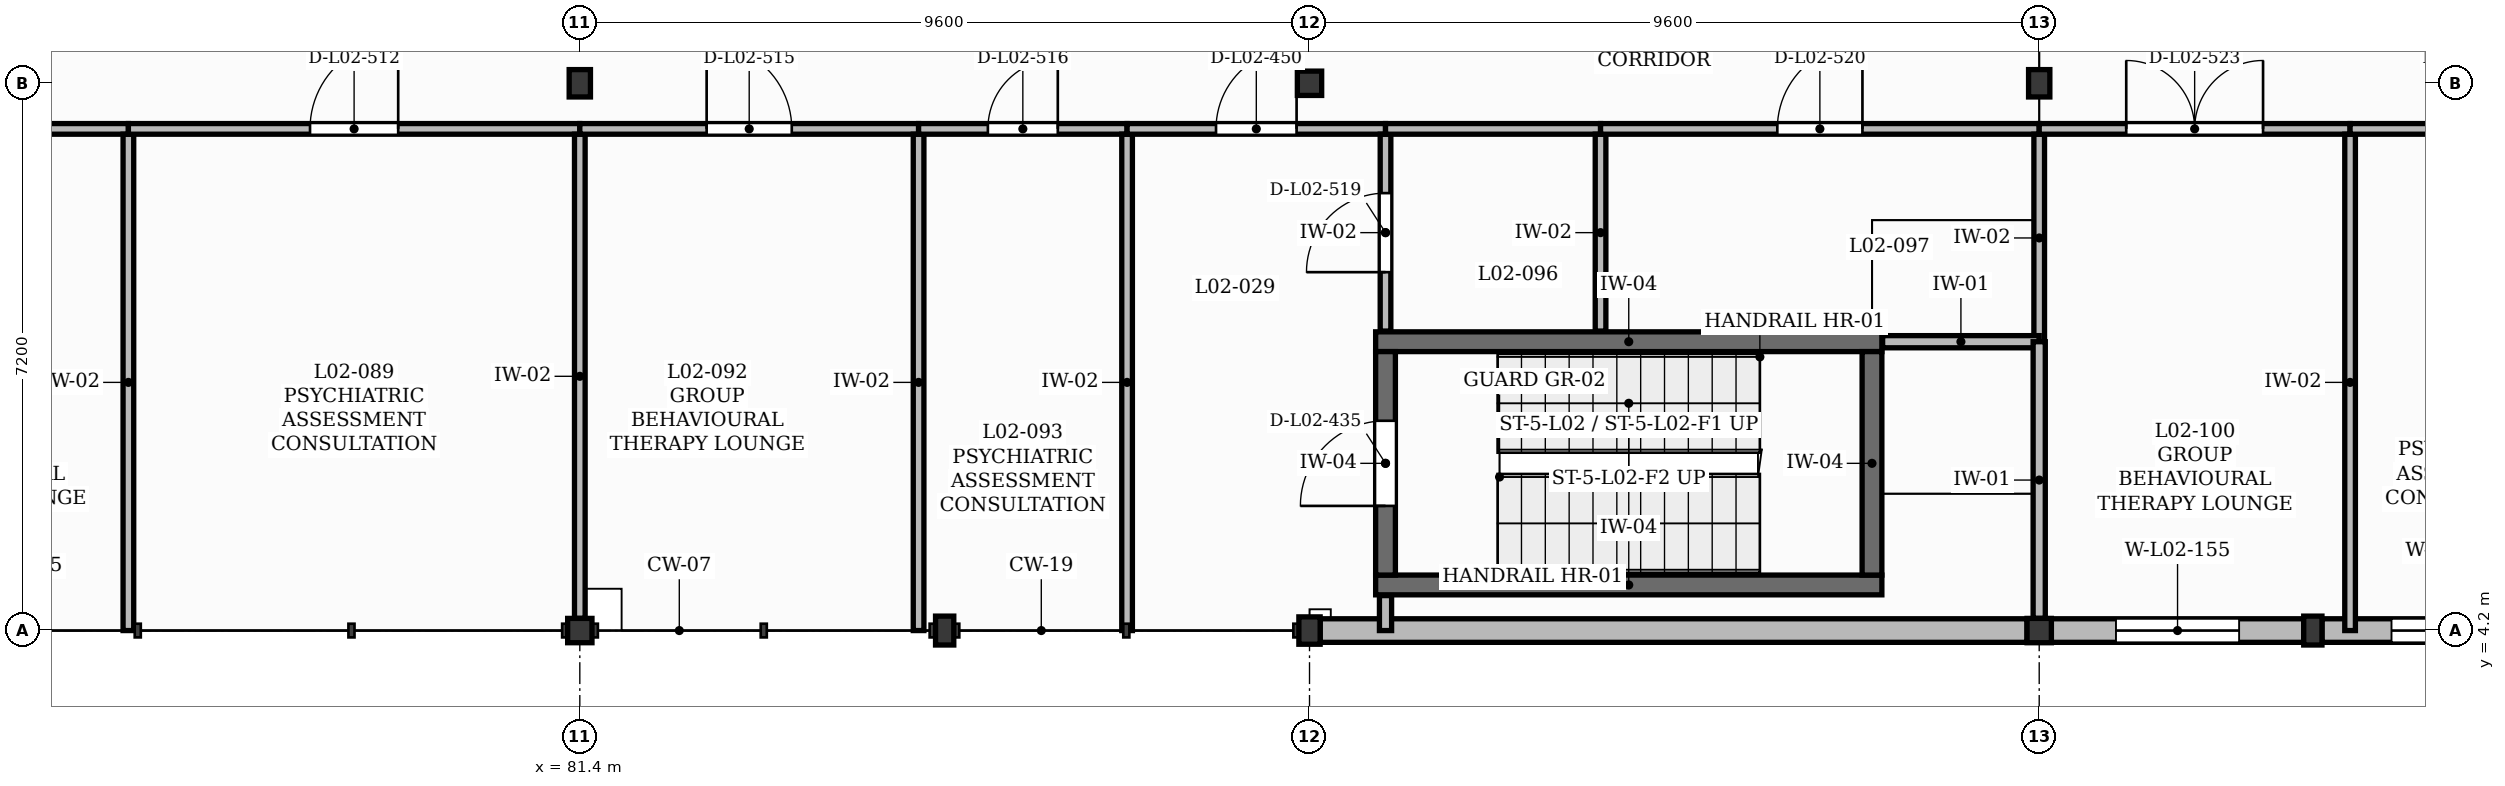
"""IFC4 building model, lengths in metres.
Left out: names, types, materials, properties, quantities, classifications, styles, units other than length and angle.
Written with IfcOpenShell. Run it as: python <this file> out.ifc"""

import sys

from ifc_helpers import new_model, si_unit, direction, frame, frame_2d, origin, origin_2d, place, context, subcontext, project, spatial, rectangle, extrude, element, fill, save


model = new_model("IFC4")
c1 = context("Model", 3, precision=1e-05, world=origin(), true_north=direction((0.0, 1.0)))
c2 = subcontext(c1, "Body", "Model", "MODEL_VIEW")
j1 = project(units=[si_unit("LENGTHUNIT", "METRE"), si_unit("PLANEANGLEUNIT", "RADIAN")], contexts=[c1])
p1 = place(None, origin())
s1 = spatial("IfcSite", under=j1, at=p1, CompositionType="ELEMENT")
p2 = place(p1, origin())
s2 = spatial("IfcBuilding", under=s1, at=p2, CompositionType="ELEMENT")
p3 = place(p2, frame((0.0, 0.0, 9.0)))
s3 = spatial("IfcBuildingStorey", under=s2, at=p3, CompositionType="ELEMENT", Elevation=9.0)
p4 = place(p3, frame((81.4, 4.2, 0.0), z_axis=(0.0, 0.0, 1.0), x_axis=(1.0, 0.0, 0.0)))
e1 = element("IfcColumn", 1, at=p4, inside=s3, PredefinedType="COLUMN", context=c2, shape_type="SweptSolid", body=[
    extrude(rectangle(XDim=0.32, YDim=0.32, at=origin_2d()), origin(), (0.0, 0.0, 1.0), 3.99),
])
for number, where, z_axis, x_axis in (
    (2, (81.4, 11.4, 0.0), (0.0, 0.0, 1.0), (1.0, 0.0, 0.0)),
    (3, (91.0, 4.2, 0.0), (0.0, 0.0, 1.0), (1.0, 0.0, 0.0)),
):
    element("IfcColumn", number, at=place(p3, frame(where, z_axis=z_axis, x_axis=x_axis)), inside=s3, PredefinedType="COLUMN", context=c2, shape_type="SweptSolid", body=[
        extrude(rectangle(XDim=0.28, YDim=0.36, at=origin_2d()), origin(), (0.0, 0.0, 1.0), 3.99),
    ])
for number, where, z_axis, x_axis in (
    (4, (91.0, 11.4, 0.0), (0.0, 0.0, 1.0), (1.0, 0.0, 0.0)),
    (5, (100.6, 4.2, 0.0), (0.0, 0.0, 1.0), (1.0, 0.0, 0.0)),
):
    element("IfcColumn", number, at=place(p3, frame(where, z_axis=z_axis, x_axis=x_axis)), inside=s3, PredefinedType="COLUMN", context=c2, shape_type="SweptSolid", body=[
        extrude(rectangle(XDim=0.32, YDim=0.32, at=origin_2d()), origin(), (0.0, 0.0, 1.0), 3.99),
    ])
p5 = place(p3, frame((100.6, 11.4, 0.0), z_axis=(0.0, 0.0, 1.0), x_axis=(1.0, 0.0, 0.0)))
e6 = element("IfcColumn", 6, at=p5, inside=s3, PredefinedType="COLUMN", context=c2, shape_type="SweptSolid", body=[
    extrude(rectangle(XDim=0.28, YDim=0.36, at=origin_2d()), origin(), (0.0, 0.0, 1.0), 3.99),
])
for number, where, z_axis, x_axis in (
    (7, (86.2, 4.2, 0.0), (0.0, 0.0, 1.0), (1.0, 0.0, 0.0)),
    (8, (104.2, 4.2, 0.0), (0.0, 0.0, 1.0), (1.0, 0.0, 0.0)),
):
    element("IfcColumn", number, at=place(p3, frame(where, z_axis=z_axis, x_axis=x_axis)), inside=s3, PredefinedType="PILASTER", context=c2, shape_type="SweptSolid", body=[
        extrude(rectangle(XDim=0.24, YDim=0.38, at=origin_2d()), origin(), (0.0, 0.0, 1.0), 3.99),
    ])
p6 = place(p3, frame((91.14, 4.2, 0.0), z_axis=(0.0, 0.0, 1.0), x_axis=(1.0, 0.0, 0.0)))
e9 = element("IfcWall", 9, at=p6, inside=s3, PredefinedType="SOLIDWALL", context=c2, shape_type="SweptSolid", body=[
    extrude(rectangle(XDim=9.3, YDim=0.31, at=frame_2d((4.65, 0.0))), origin(), (0.0, 0.0, 1.0), 3.53),
])
p7 = place(p3, frame((100.76, 4.2, 0.0), z_axis=(0.0, 0.0, 1.0), x_axis=(1.0, 0.0, 0.0)))
e10 = element("IfcWall", 10, at=p7, inside=s3, PredefinedType="SOLIDWALL", context=c2, shape_type="SweptSolid", body=[
    extrude(rectangle(XDim=3.32, YDim=0.31, at=frame_2d((1.66, 0.0))), origin(), (0.0, 0.0, 1.0), 3.52),
])
p8 = place(p7, frame((0.85, 0.0, 1.0)))
e11 = element("IfcOpeningElement", 11, at=p8, cuts=e10, PredefinedType="OPENING", context=c2, shape_type="SweptSolid", body=[
    extrude(rectangle(XDim=1.62, YDim=1.95, at=frame_2d((0.81, 0.975))), frame((0.0, 0.165, 0.0), z_axis=(0.0, -1.0, 0.0), x_axis=(1.0, 0.0, 0.0)), (0.0, 0.0, 1.0), 0.33),
])
p9 = place(p3, frame((104.32, 4.2, 0.0), z_axis=(0.0, 0.0, 1.0), x_axis=(1.0, 0.0, 0.0)))
e12 = element("IfcWall", 12, at=p9, inside=s3, PredefinedType="SOLIDWALL", context=c2, shape_type="SweptSolid", body=[
    extrude(rectangle(XDim=3.34, YDim=0.31, at=frame_2d((1.67, 0.0))), origin(), (0.0, 0.0, 1.0), 3.52),
])
p10 = place(p9, frame((0.915, 0.0, 1.0)))
e13 = element("IfcOpeningElement", 13, at=p10, cuts=e12, PredefinedType="OPENING", context=c2, shape_type="SweptSolid", body=[
    extrude(rectangle(XDim=1.76, YDim=1.95, at=frame_2d((0.88, 0.975))), frame((0.0, 0.165, 0.0), z_axis=(0.0, -1.0, 0.0), x_axis=(1.0, 0.0, 0.0)), (0.0, 0.0, 1.0), 0.33),
])
for number, where, z_axis, x_axis in (
    (14, (91.87, 4.8, 0.0), (0.0, 0.0, 1.0), (1.0, 0.0, 0.0)),
    (15, (91.87, 8.0, 0.0), (0.0, 0.0, 1.0), (1.0, 0.0, 0.0)),
):
    element("IfcWall", number, at=place(p3, frame(where, z_axis=z_axis, x_axis=x_axis)), inside=s3, PredefinedType="SHEAR", context=c2, shape_type="SweptSolid", body=[
        extrude(rectangle(XDim=6.66, YDim=0.26, at=frame_2d((3.33, 0.0))), origin(), (0.0, 0.0, 1.0), 3.95),
    ])
p11 = place(p3, frame((92.0, 4.93, 0.0), z_axis=(0.0, 0.0, 1.0), x_axis=(0.0, 1.0, 0.0)))
e16 = element("IfcWall", 16, at=p11, inside=s3, PredefinedType="SHEAR", context=c2, shape_type="SweptSolid", body=[
    extrude(rectangle(XDim=2.94, YDim=0.26, at=frame_2d((1.47, 0.0))), origin(), (0.0, 0.0, 1.0), 3.95),
])
p12 = place(p11, frame((0.91, 0.0, 0.0)))
e17 = element("IfcOpeningElement", 17, at=p12, cuts=e16, PredefinedType="OPENING", context=c2, shape_type="SweptSolid", body=[
    extrude(rectangle(XDim=1.12, YDim=2.1, at=frame_2d((0.56, 1.05))), frame((0.0, 0.14, 0.0), z_axis=(0.0, -1.0, 0.0), x_axis=(1.0, 0.0, 0.0)), (0.0, 0.0, 1.0), 0.28),
])
p13 = place(p3, frame((98.4, 4.93, 0.0), z_axis=(0.0, 0.0, 1.0), x_axis=(0.0, 1.0, 0.0)))
e18 = element("IfcWall", 18, at=p13, inside=s3, PredefinedType="SHEAR", context=c2, shape_type="SweptSolid", body=[
    extrude(rectangle(XDim=2.94, YDim=0.26, at=frame_2d((1.47, 0.0))), origin(), (0.0, 0.0, 1.0), 3.95),
])
p14 = place(p3, frame((71.805, 10.8, 0.0), z_axis=(0.0, 0.0, 1.0), x_axis=(1.0, 0.0, 0.0)))
e19 = element("IfcWall", 19, at=p14, inside=s3, PredefinedType="PARTITIONING", context=c2, shape_type="SweptSolid", body=[
    extrude(rectangle(XDim=3.656, YDim=0.14, at=frame_2d((1.828, 0.0))), origin(), (0.0, 0.0, 1.0), 3.96),
])
p15 = place(p14, frame((1.368, 0.0, 0.0)))
e20 = element("IfcOpeningElement", 20, at=p15, cuts=e19, PredefinedType="OPENING", context=c2, shape_type="SweptSolid", body=[
    extrude(rectangle(XDim=0.92, YDim=2.1, at=frame_2d((0.46, 1.05))), frame((0.0, 0.08, 0.0), z_axis=(0.0, -1.0, 0.0), x_axis=(1.0, 0.0, 0.0)), (0.0, 0.0, 1.0), 0.16),
])
p16 = place(p3, frame((75.461, 4.2, 0.0), z_axis=(0.0, 0.0, 1.0), x_axis=(0.0, 1.0, 0.0)))
e21 = element("IfcWall", 21, at=p16, inside=s3, PredefinedType="PARTITIONING", context=c2, shape_type="SweptSolid", body=[
    extrude(rectangle(XDim=6.53, YDim=0.14, at=frame_2d((3.265, 0.0))), origin(), (0.0, 0.0, 1.0), 3.96),
])
p17 = place(p3, frame((75.461, 10.8, 0.0), z_axis=(0.0, 0.0, 1.0), x_axis=(1.0, 0.0, 0.0)))
e22 = element("IfcWall", 22, at=p17, inside=s3, PredefinedType="PARTITIONING", context=c2, shape_type="SweptSolid", body=[
    extrude(rectangle(XDim=5.939, YDim=0.14, at=frame_2d((2.969, 0.0))), origin(), (0.0, 0.0, 1.0), 3.96),
])
p18 = place(p17, frame((2.389, 0.0, 0.0)))
e23 = element("IfcOpeningElement", 23, at=p18, cuts=e22, PredefinedType="OPENING", context=c2, shape_type="SweptSolid", body=[
    extrude(rectangle(XDim=1.16, YDim=2.1, at=frame_2d((0.58, 1.05))), frame((0.0, 0.08, 0.0), z_axis=(0.0, -1.0, 0.0), x_axis=(1.0, 0.0, 0.0)), (0.0, 0.0, 1.0), 0.16),
])
p19 = place(p3, frame((81.4, 4.36, 0.0), z_axis=(0.0, 0.0, 1.0), x_axis=(0.0, 1.0, 0.0)))
e24 = element("IfcWall", 24, at=p19, inside=s3, PredefinedType="PARTITIONING", context=c2, shape_type="SweptSolid", body=[
    extrude(rectangle(XDim=6.37, YDim=0.14, at=frame_2d((3.185, 0.0))), origin(), (0.0, 0.0, 1.0), 3.47),
])
p20 = place(p3, frame((81.4, 10.8, 0.0), z_axis=(0.0, 0.0, 1.0), x_axis=(1.0, 0.0, 0.0)))
e25 = element("IfcWall", 25, at=p20, inside=s3, PredefinedType="PARTITIONING", context=c2, shape_type="SweptSolid", body=[
    extrude(rectangle(XDim=4.457, YDim=0.14, at=frame_2d((2.229, 0.0))), origin(), (0.0, 0.0, 1.0), 3.96),
])
p21 = place(p20, frame((1.668, 0.0, 0.0)))
e26 = element("IfcOpeningElement", 26, at=p21, cuts=e25, PredefinedType="OPENING", context=c2, shape_type="SweptSolid", body=[
    extrude(rectangle(XDim=1.12, YDim=2.15, at=frame_2d((0.56, 1.075))), frame((0.0, 0.08, 0.0), z_axis=(0.0, -1.0, 0.0), x_axis=(1.0, 0.0, 0.0)), (0.0, 0.0, 1.0), 0.16),
])
p22 = place(p3, frame((85.857, 4.2, 0.0), z_axis=(0.0, 0.0, 1.0), x_axis=(0.0, 1.0, 0.0)))
e27 = element("IfcWall", 27, at=p22, inside=s3, PredefinedType="PARTITIONING", context=c2, shape_type="SweptSolid", body=[
    extrude(rectangle(XDim=6.53, YDim=0.14, at=frame_2d((3.265, 0.0))), origin(), (0.0, 0.0, 1.0), 3.96),
])
p23 = place(p3, frame((85.857, 10.8, 0.0), z_axis=(0.0, 0.0, 1.0), x_axis=(1.0, 0.0, 0.0)))
e28 = element("IfcWall", 28, at=p23, inside=s3, PredefinedType="PARTITIONING", context=c2, shape_type="SweptSolid", body=[
    extrude(rectangle(XDim=2.743, YDim=0.14, at=frame_2d((1.372, 0.0))), origin(), (0.0, 0.0, 1.0), 3.96),
])
p24 = place(p23, frame((0.912, 0.0, 0.0)))
e29 = element("IfcOpeningElement", 29, at=p24, cuts=e28, PredefinedType="OPENING", context=c2, shape_type="SweptSolid", body=[
    extrude(rectangle(XDim=0.92, YDim=2.1, at=frame_2d((0.46, 1.05))), frame((0.0, 0.08, 0.0), z_axis=(0.0, -1.0, 0.0), x_axis=(1.0, 0.0, 0.0)), (0.0, 0.0, 1.0), 0.16),
])
p25 = place(p3, frame((88.6, 4.2, 0.0), z_axis=(0.0, 0.0, 1.0), x_axis=(0.0, 1.0, 0.0)))
e30 = element("IfcWall", 30, at=p25, inside=s3, PredefinedType="PARTITIONING", context=c2, shape_type="SweptSolid", body=[
    extrude(rectangle(XDim=6.53, YDim=0.14, at=frame_2d((3.265, 0.0))), origin(), (0.0, 0.0, 1.0), 3.63),
])
p26 = place(p3, frame((88.6, 10.8, 0.0), z_axis=(0.0, 0.0, 1.0), x_axis=(1.0, 0.0, 0.0)))
e31 = element("IfcWall", 31, at=p26, inside=s3, PredefinedType="PARTITIONING", context=c2, shape_type="SweptSolid", body=[
    extrude(rectangle(XDim=3.4, YDim=0.14, at=frame_2d((1.7, 0.0))), origin(), (0.0, 0.0, 1.0), 3.96),
])
p27 = place(p26, frame((1.17, 0.0, 0.0)))
e32 = element("IfcOpeningElement", 32, at=p27, cuts=e31, PredefinedType="OPENING", context=c2, shape_type="SweptSolid", body=[
    extrude(rectangle(XDim=1.06, YDim=2.15, at=frame_2d((0.53, 1.075))), frame((0.0, 0.08, 0.0), z_axis=(0.0, -1.0, 0.0), x_axis=(1.0, 0.0, 0.0)), (0.0, 0.0, 1.0), 0.16),
])
p28 = place(p3, frame((92.0, 8.14, 0.0), z_axis=(0.0, 0.0, 1.0), x_axis=(0.0, 1.0, 0.0)))
e33 = element("IfcWall", 33, at=p28, inside=s3, PredefinedType="PARTITIONING", context=c2, shape_type="SweptSolid", body=[
    extrude(rectangle(XDim=2.59, YDim=0.14, at=frame_2d((1.295, 0.0))), origin(), (0.0, 0.0, 1.0), 3.96),
])
p29 = place(p28, frame((0.775, 0.0, 0.0)))
e34 = element("IfcOpeningElement", 34, at=p29, cuts=e33, PredefinedType="OPENING", context=c2, shape_type="SweptSolid", body=[
    extrude(rectangle(XDim=1.04, YDim=2.1, at=frame_2d((0.52, 1.05))), frame((0.0, 0.08, 0.0), z_axis=(0.0, -1.0, 0.0), x_axis=(1.0, 0.0, 0.0)), (0.0, 0.0, 1.0), 0.16),
])
p30 = place(p3, frame((92.0, 10.8, 0.0), z_axis=(0.0, 0.0, 1.0), x_axis=(1.0, 0.0, 0.0)))
e35 = element("IfcWall", 35, at=p30, inside=s3, PredefinedType="PARTITIONING", context=c2, shape_type="SweptSolid", body=[
    extrude(rectangle(XDim=2.829, YDim=0.14, at=frame_2d((1.415, 0.0))), origin(), (0.0, 0.0, 1.0), 3.96),
])
p31 = place(p3, frame((94.829, 8.14, 0.0), z_axis=(0.0, 0.0, 1.0), x_axis=(0.0, 1.0, 0.0)))
e36 = element("IfcWall", 36, at=p31, inside=s3, PredefinedType="PARTITIONING", context=c2, shape_type="SweptSolid", body=[
    extrude(rectangle(XDim=2.59, YDim=0.14, at=frame_2d((1.295, 0.0))), origin(), (0.0, 0.0, 1.0), 3.96),
])
p32 = place(p3, frame((94.829, 10.8, 0.0), z_axis=(0.0, 0.0, 1.0), x_axis=(1.0, 0.0, 0.0)))
e37 = element("IfcWall", 37, at=p32, inside=s3, PredefinedType="PARTITIONING", context=c2, shape_type="SweptSolid", body=[
    extrude(rectangle(XDim=5.771, YDim=0.14, at=frame_2d((2.885, 0.0))), origin(), (0.0, 0.0, 1.0), 3.96),
])
p33 = place(p32, frame((2.325, 0.0, 0.0)))
e38 = element("IfcOpeningElement", 38, at=p33, cuts=e37, PredefinedType="OPENING", context=c2, shape_type="SweptSolid", body=[
    extrude(rectangle(XDim=1.12, YDim=2.15, at=frame_2d((0.56, 1.075))), frame((0.0, 0.08, 0.0), z_axis=(0.0, -1.0, 0.0), x_axis=(1.0, 0.0, 0.0)), (0.0, 0.0, 1.0), 0.16),
])
p34 = place(p3, frame((100.6, 8.0, 0.0), z_axis=(0.0, 0.0, 1.0), x_axis=(0.0, 1.0, 0.0)))
e39 = element("IfcWall", 39, at=p34, inside=s3, PredefinedType="PARTITIONING", context=c2, shape_type="SweptSolid", body=[
    extrude(rectangle(XDim=2.73, YDim=0.14, at=frame_2d((1.365, 0.0))), origin(), (0.0, 0.0, 1.0), 3.47),
])
p35 = place(p3, frame((100.6, 10.8, 0.0), z_axis=(0.0, 0.0, 1.0), x_axis=(1.0, 0.0, 0.0)))
e40 = element("IfcWall", 40, at=p35, inside=s3, PredefinedType="PARTITIONING", context=c2, shape_type="SweptSolid", body=[
    extrude(rectangle(XDim=4.09, YDim=0.14, at=frame_2d((2.045, 0.0))), origin(), (0.0, 0.0, 1.0), 3.96),
])
p36 = place(p35, frame((1.145, 0.0, 0.0)))
e41 = element("IfcOpeningElement", 41, at=p36, cuts=e40, PredefinedType="OPENING", context=c2, shape_type="SweptSolid", body=[
    extrude(rectangle(XDim=1.8, YDim=2.3, at=frame_2d((0.9, 1.15))), frame((0.0, 0.08, 0.0), z_axis=(0.0, -1.0, 0.0), x_axis=(1.0, 0.0, 0.0)), (0.0, 0.0, 1.0), 0.16),
])
p37 = place(p3, frame((104.69, 4.2, 0.0), z_axis=(0.0, 0.0, 1.0), x_axis=(0.0, 1.0, 0.0)))
e42 = element("IfcWall", 42, at=p37, inside=s3, PredefinedType="PARTITIONING", context=c2, shape_type="SweptSolid", body=[
    extrude(rectangle(XDim=6.53, YDim=0.14, at=frame_2d((3.265, 0.0))), origin(), (0.0, 0.0, 1.0), 3.96),
])
p38 = place(p3, frame((104.69, 10.8, 0.0), z_axis=(0.0, 0.0, 1.0), x_axis=(1.0, 0.0, 0.0)))
e43 = element("IfcWall", 43, at=p38, inside=s3, PredefinedType="PARTITIONING", context=c2, shape_type="SweptSolid", body=[
    extrude(rectangle(XDim=3.11, YDim=0.14, at=frame_2d((1.555, 0.0))), origin(), (0.0, 0.0, 1.0), 3.96),
])
p39 = place(p38, frame((1.035, 0.0, 0.0)))
e44 = element("IfcOpeningElement", 44, at=p39, cuts=e43, PredefinedType="OPENING", context=c2, shape_type="SweptSolid", body=[
    extrude(rectangle(XDim=1.04, YDim=2.1, at=frame_2d((0.52, 1.05))), frame((0.0, 0.08, 0.0), z_axis=(0.0, -1.0, 0.0), x_axis=(1.0, 0.0, 0.0)), (0.0, 0.0, 1.0), 0.16),
])
p40 = place(p3, frame((92.0, 4.2, 0.0), z_axis=(0.0, 0.0, 1.0), x_axis=(0.0, 1.0, 0.0)))
e45 = element("IfcWall", 45, at=p40, inside=s3, PredefinedType="PARTITIONING", context=c2, shape_type="SweptSolid", body=[
    extrude(rectangle(XDim=0.46, YDim=0.16, at=frame_2d((0.23, 0.0))), origin(), (0.0, 0.0, 1.0), 3.96),
])
p41 = place(p3, frame((98.54, 8.0, 0.0), z_axis=(0.0, 0.0, 1.0), x_axis=(1.0, 0.0, 0.0)))
e46 = element("IfcWall", 46, at=p41, inside=s3, PredefinedType="PARTITIONING", context=c2, shape_type="SweptSolid", body=[
    extrude(rectangle(XDim=2.06, YDim=0.16, at=frame_2d((1.03, 0.0))), origin(), (0.0, 0.0, 1.0), 3.96),
])
p42 = place(p3, frame((100.6, 4.36, 0.0), z_axis=(0.0, 0.0, 1.0), x_axis=(0.0, 1.0, 0.0)))
e47 = element("IfcWall", 47, at=p42, inside=s3, PredefinedType="PARTITIONING", context=c2, shape_type="SweptSolid", body=[
    extrude(rectangle(XDim=3.64, YDim=0.16, at=frame_2d((1.82, 0.0))), origin(), (0.0, 0.0, 1.0), 3.47),
])
p43 = place(p8, origin())
e48 = element("IfcWindow", 48, at=p43, inside=s3, PartitioningType="DOUBLE_PANEL_VERTICAL", PredefinedType="WINDOW", context=c2, shape_type="SweptSolid", body=[
    extrude(rectangle(XDim=1.62, YDim=1.95, at=frame_2d((0.81, 0.975))), frame((0.0, 0.03, 0.0), z_axis=(0.0, -1.0, 0.0), x_axis=(1.0, 0.0, 0.0)), (0.0, 0.0, 1.0), 0.06),
])
fill(e11, e48)
p44 = place(p10, origin())
e49 = element("IfcWindow", 49, at=p44, inside=s3, PartitioningType="DOUBLE_PANEL_VERTICAL", PredefinedType="WINDOW", context=c2, shape_type="SweptSolid", body=[
    extrude(rectangle(XDim=1.76, YDim=1.95, at=frame_2d((0.88, 0.975))), frame((0.0, 0.03, 0.0), z_axis=(0.0, -1.0, 0.0), x_axis=(1.0, 0.0, 0.0)), (0.0, 0.0, 1.0), 0.06),
])
fill(e13, e49)
p45 = place(p12, origin())
e50 = element("IfcDoor", 50, at=p45, inside=s3, OperationType="SINGLE_SWING_LEFT", PredefinedType="DOOR", context=c2, shape_type="SweptSolid", body=[
    extrude(rectangle(XDim=1.12, YDim=2.1, at=frame_2d((0.56, 1.05))), frame((0.0, 0.025, 0.0), z_axis=(0.0, -1.0, 0.0), x_axis=(1.0, 0.0, 0.0)), (0.0, 0.0, 1.0), 0.05),
])
fill(e17, e50)
p46 = place(p27, origin())
e51 = element("IfcDoor", 51, at=p46, inside=s3, OperationType="SINGLE_SWING_RIGHT", PredefinedType="DOOR", context=c2, shape_type="SweptSolid", body=[
    extrude(rectangle(XDim=1.06, YDim=2.15, at=frame_2d((0.53, 1.075))), frame((0.0, 0.025, 0.0), z_axis=(0.0, -1.0, 0.0), x_axis=(1.0, 0.0, 0.0)), (0.0, 0.0, 1.0), 0.05),
])
fill(e32, e51)
p47 = place(p18, origin())
e52 = element("IfcDoor", 52, at=p47, inside=s3, OperationType="SINGLE_SWING_RIGHT", PredefinedType="DOOR", context=c2, shape_type="SweptSolid", body=[
    extrude(rectangle(XDim=1.16, YDim=2.1, at=frame_2d((0.58, 1.05))), frame((0.0, 0.025, 0.0), z_axis=(0.0, -1.0, 0.0), x_axis=(1.0, 0.0, 0.0)), (0.0, 0.0, 1.0), 0.05),
])
fill(e23, e52)
p48 = place(p21, origin())
e53 = element("IfcDoor", 53, at=p48, inside=s3, OperationType="SINGLE_SWING_LEFT", PredefinedType="DOOR", context=c2, shape_type="SweptSolid", body=[
    extrude(rectangle(XDim=1.12, YDim=2.15, at=frame_2d((0.56, 1.075))), frame((0.0, 0.025, 0.0), z_axis=(0.0, -1.0, 0.0), x_axis=(1.0, 0.0, 0.0)), (0.0, 0.0, 1.0), 0.05),
])
fill(e26, e53)
p49 = place(p24, origin())
e54 = element("IfcDoor", 54, at=p49, inside=s3, OperationType="SINGLE_SWING_RIGHT", PredefinedType="DOOR", context=c2, shape_type="SweptSolid", body=[
    extrude(rectangle(XDim=0.92, YDim=2.1, at=frame_2d((0.46, 1.05))), frame((0.0, 0.025, 0.0), z_axis=(0.0, -1.0, 0.0), x_axis=(1.0, 0.0, 0.0)), (0.0, 0.0, 1.0), 0.05),
])
fill(e29, e54)
p50 = place(p29, origin())
e55 = element("IfcDoor", 55, at=p50, inside=s3, OperationType="SINGLE_SWING_LEFT", PredefinedType="DOOR", context=c2, shape_type="SweptSolid", body=[
    extrude(rectangle(XDim=1.04, YDim=2.1, at=frame_2d((0.52, 1.05))), frame((0.0, 0.025, 0.0), z_axis=(0.0, -1.0, 0.0), x_axis=(1.0, 0.0, 0.0)), (0.0, 0.0, 1.0), 0.05),
])
fill(e34, e55)
p51 = place(p33, origin())
e56 = element("IfcDoor", 56, at=p51, inside=s3, OperationType="SINGLE_SWING_RIGHT", PredefinedType="DOOR", context=c2, shape_type="SweptSolid", body=[
    extrude(rectangle(XDim=1.12, YDim=2.15, at=frame_2d((0.56, 1.075))), frame((0.0, 0.025, 0.0), z_axis=(0.0, -1.0, 0.0), x_axis=(1.0, 0.0, 0.0)), (0.0, 0.0, 1.0), 0.05),
])
fill(e38, e56)
p52 = place(p36, origin())
e57 = element("IfcDoor", 57, at=p52, inside=s3, OperationType="DOUBLE_DOOR_SINGLE_SWING", PredefinedType="DOOR", context=c2, shape_type="SweptSolid", body=[
    extrude(rectangle(XDim=1.8, YDim=2.3, at=frame_2d((0.9, 1.15))), frame((0.0, 0.025, 0.0), z_axis=(0.0, -1.0, 0.0), x_axis=(1.0, 0.0, 0.0)), (0.0, 0.0, 1.0), 0.05),
])
fill(e41, e57)
save(model, sys.argv[1])
